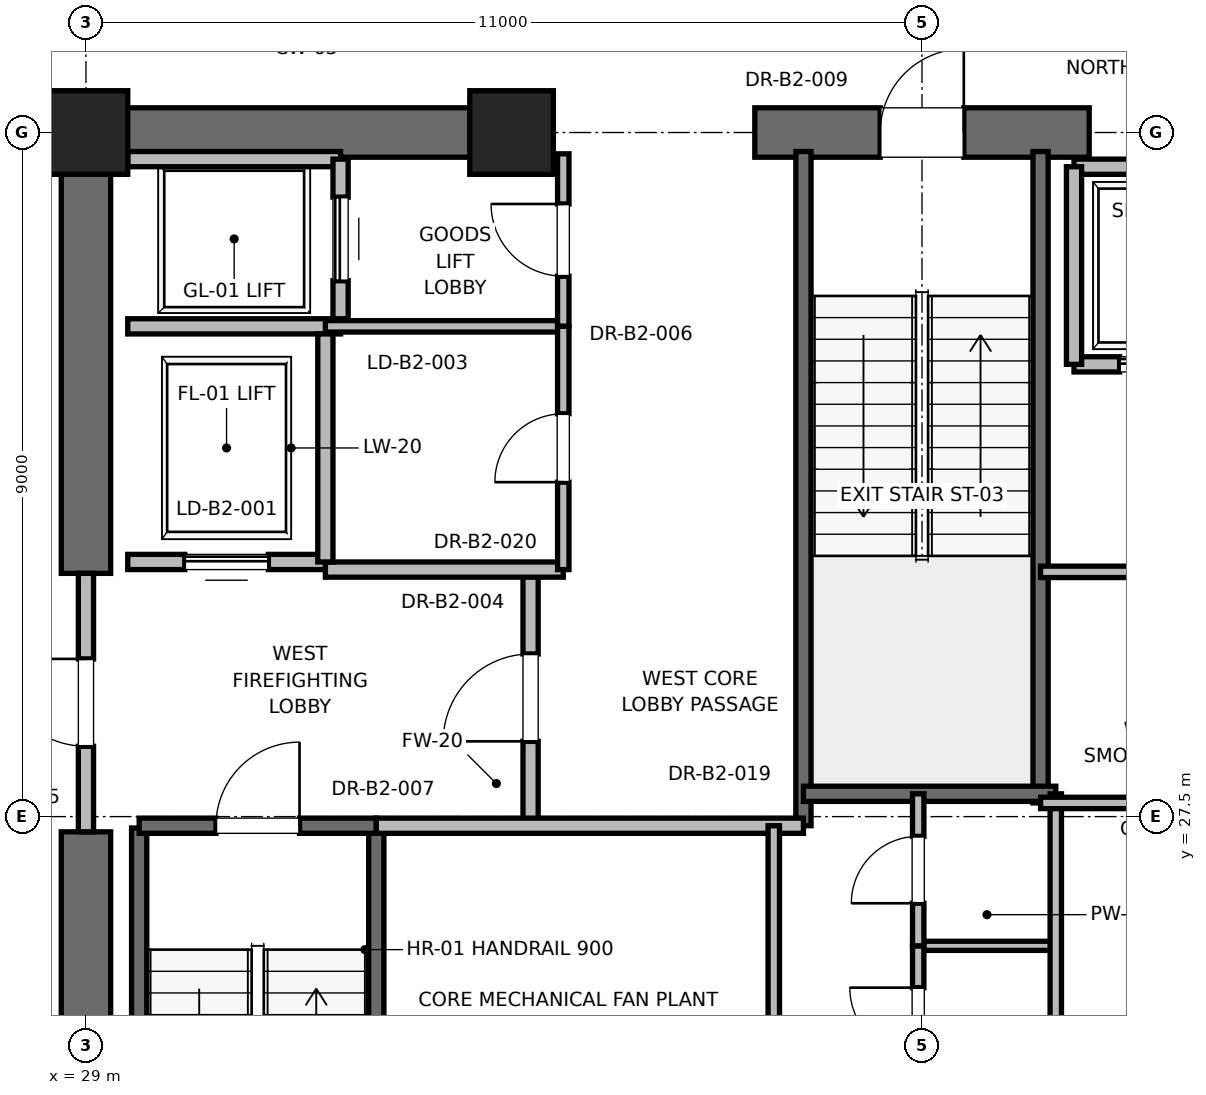
"""IFC4 building model, lengths in metres.
Left out: names, types, materials, properties, quantities, classifications, styles, units other than length and angle.
Written with IfcOpenShell. Run it as: python <this file> out.ifc"""

import sys

from ifc_helpers import new_model, si_unit, direction, frame, frame_2d, origin, origin_2d, place, context, subcontext, project, spatial, rectangle, extrude, element, fill, save


model = new_model("IFC4")
c1 = context("Model", 3, precision=1e-05, world=origin(), true_north=direction((0.0, 1.0)))
c2 = subcontext(c1, "Body", "Model", "MODEL_VIEW")
j1 = project(units=[si_unit("LENGTHUNIT", "METRE"), si_unit("PLANEANGLEUNIT", "RADIAN")], contexts=[c1])
p1 = place(None, origin())
s1 = spatial("IfcSite", under=j1, at=p1, CompositionType="ELEMENT")
p2 = place(p1, origin())
s2 = spatial("IfcBuilding", under=s1, at=p2, CompositionType="ELEMENT")
p3 = place(p2, frame((0.0, 0.0, -9.0)))
s3 = spatial("IfcBuildingStorey", under=s2, at=p3, CompositionType="ELEMENT", Elevation=-9.0)
for number, where, z_axis, x_axis in (
    (1, (29.0, 36.5, -0.3), (0.0, 0.0, 1.0), (1.0, 0.0, 0.0)),
    (2, (34.6, 36.5, -0.3), (0.0, 0.0, 1.0), (1.0, 0.0, 0.0)),
):
    element("IfcColumn", number, at=place(p3, frame(where, z_axis=z_axis, x_axis=x_axis)), inside=s3, PredefinedType="PILASTER", context=c2, shape_type="SweptSolid", body=[
        extrude(rectangle(XDim=1.1, YDim=1.1, at=origin_2d()), origin(), (0.0, 0.0, 1.0), 4.8),
    ])
p4 = place(p3, frame((29.0, 36.5, -0.3), z_axis=(0.0, 0.0, 1.0), x_axis=(1.0, 0.0, 0.0)))
e3 = element("IfcWall", 3, at=p4, inside=s3, PredefinedType="SHEAR", context=c2, shape_type="SweptSolid", body=[
    extrude(rectangle(XDim=5.8, YDim=0.65, at=frame_2d((2.9, 0.0))), origin(), (0.0, 0.0, 1.0), 4.5),
])
p5 = place(p3, frame((37.8, 36.5, -0.3), z_axis=(0.0, 0.0, 1.0), x_axis=(1.0, 0.0, 0.0)))
e4 = element("IfcWall", 4, at=p5, inside=s3, PredefinedType="SHEAR", context=c2, shape_type="SweptSolid", body=[
    extrude(rectangle(XDim=4.4, YDim=0.65, at=frame_2d((2.2, 0.0))), origin(), (0.0, 0.0, 1.0), 4.5),
])
p6 = place(p5, frame((1.65, 0.0, 0.3)))
e5 = element("IfcOpeningElement", 5, at=p6, cuts=e4, PredefinedType="OPENING", context=c2, shape_type="SweptSolid", body=[
    extrude(rectangle(XDim=1.1, YDim=2.15, at=frame_2d((0.55, 1.075))), frame((0.0, 0.325, 0.0), z_axis=(0.0, -1.0, 0.0), x_axis=(1.0, 0.0, 0.0)), (0.0, 0.0, 1.0), 0.65),
])
p7 = place(p3, frame((29.0, 18.5, -0.3), z_axis=(0.0, 0.0, 1.0), x_axis=(0.0, 1.0, 0.0)))
e6 = element("IfcWall", 6, at=p7, inside=s3, PredefinedType="SHEAR", context=c2, shape_type="SweptSolid", body=[
    extrude(rectangle(XDim=8.8, YDim=0.65, at=frame_2d((4.4, 0.0))), origin(), (0.0, 0.0, 1.0), 4.5),
])
p8 = place(p3, frame((29.0, 30.7, -0.3), z_axis=(0.0, 0.0, 1.0), x_axis=(0.0, 1.0, 0.0)))
e7 = element("IfcWall", 7, at=p8, inside=s3, PredefinedType="SHEAR", context=c2, shape_type="SweptSolid", body=[
    extrude(rectangle(XDim=5.8, YDim=0.65, at=frame_2d((2.9, 0.0))), origin(), (0.0, 0.0, 1.0), 4.5),
])
p9 = place(p3, frame((29.7, 19.2, -0.3), z_axis=(0.0, 0.0, 1.0), x_axis=(0.0, 1.0, 0.0)))
e8 = element("IfcWall", 8, at=p9, inside=s3, PredefinedType="SOLIDWALL", context=c2, shape_type="SweptSolid", body=[
    extrude(rectangle(XDim=8.15, YDim=0.2, at=frame_2d((4.075, 0.0))), origin(), (0.0, 0.0, 1.0), 4.5),
])
p10 = place(p3, frame((32.82, 18.6, -0.3), z_axis=(0.0, 0.0, 1.0), x_axis=(0.0, 1.0, 0.0)))
e9 = element("IfcWall", 9, at=p10, inside=s3, PredefinedType="SOLIDWALL", context=c2, shape_type="SweptSolid", body=[
    extrude(rectangle(XDim=8.78, YDim=0.2, at=frame_2d((4.39, 0.0))), origin(), (0.0, 0.0, 1.0), 4.5),
])
p11 = place(p3, frame((29.7, 27.38, -0.3), z_axis=(0.0, 0.0, 1.0), x_axis=(1.0, 0.0, 0.0)))
e10 = element("IfcWall", 10, at=p11, inside=s3, PredefinedType="SOLIDWALL", context=c2, shape_type="SweptSolid", body=[
    extrude(rectangle(XDim=3.12, YDim=0.2, at=frame_2d((1.56, 0.0))), origin(), (0.0, 0.0, 1.0), 4.5),
])
p12 = place(p11, frame((1.01, 0.0, 0.3)))
e11 = element("IfcOpeningElement", 11, at=p12, cuts=e10, PredefinedType="OPENING", context=c2, shape_type="SweptSolid", body=[
    extrude(rectangle(XDim=1.1, YDim=2.15, at=frame_2d((0.55, 1.075))), frame((0.0, 0.1, 0.0), z_axis=(0.0, -1.0, 0.0), x_axis=(1.0, 0.0, 0.0)), (0.0, 0.0, 1.0), 0.2),
])
p13 = place(p3, frame((38.44, 27.38, -0.3), z_axis=(0.0, 0.0, 1.0), x_axis=(0.0, 1.0, 0.0)))
e12 = element("IfcWall", 12, at=p13, inside=s3, PredefinedType="SOLIDWALL", context=c2, shape_type="SweptSolid", body=[
    extrude(rectangle(XDim=8.87, YDim=0.2, at=frame_2d((4.435, 0.0))), origin(), (0.0, 0.0, 1.0), 4.5),
])
p14 = place(p3, frame((41.56, 27.68, -0.3), z_axis=(0.0, 0.0, 1.0), x_axis=(0.0, 1.0, 0.0)))
e13 = element("IfcWall", 13, at=p14, inside=s3, PredefinedType="SOLIDWALL", context=c2, shape_type="SweptSolid", body=[
    extrude(rectangle(XDim=8.57, YDim=0.2, at=frame_2d((4.285, 0.0))), origin(), (0.0, 0.0, 1.0), 4.5),
])
p15 = place(p3, frame((38.44, 27.8, -0.3), z_axis=(0.0, 0.0, 1.0), x_axis=(1.0, 0.0, 0.0)))
e14 = element("IfcWall", 14, at=p15, inside=s3, PredefinedType="SOLIDWALL", context=c2, shape_type="SweptSolid", body=[
    extrude(rectangle(XDim=3.32, YDim=0.2, at=frame_2d((1.66, 0.0))), origin(), (0.0, 0.0, 1.0), 4.5),
])
p16 = place(p3, frame((34.85, 27.38, 0.0), z_axis=(0.0, 0.0, 1.0), x_axis=(0.0, 1.0, 0.0)))
e15 = element("IfcWall", 15, at=p16, inside=s3, PredefinedType="PARTITIONING", context=c2, shape_type="SweptSolid", body=[
    extrude(rectangle(XDim=3.37, YDim=0.2, at=frame_2d((1.685, 0.0))), origin(), (0.0, 0.0, 1.0), 4.2),
])
p17 = place(p16, frame((1.11, 0.0, 0.0)))
e16 = element("IfcOpeningElement", 16, at=p17, cuts=e15, PredefinedType="OPENING", context=c2, shape_type="SweptSolid", body=[
    extrude(rectangle(XDim=1.15, YDim=2.2, at=frame_2d((0.575, 1.1))), frame((0.0, 0.1, 0.0), z_axis=(0.0, -1.0, 0.0), x_axis=(1.0, 0.0, 0.0)), (0.0, 0.0, 1.0), 0.2),
])
p18 = place(p3, frame((29.0, 27.3, 0.0), z_axis=(0.0, 0.0, 1.0), x_axis=(0.0, 1.0, 0.0)))
e17 = element("IfcWall", 17, at=p18, inside=s3, PredefinedType="PARTITIONING", context=c2, shape_type="SweptSolid", body=[
    extrude(rectangle(XDim=3.4, YDim=0.2, at=frame_2d((1.7, 0.0))), origin(), (0.0, 0.0, 1.0), 2.98),
])
p19 = place(p18, frame((1.125, 0.0, 0.0)))
e18 = element("IfcOpeningElement", 18, at=p19, cuts=e17, PredefinedType="OPENING", context=c2, shape_type="SweptSolid", body=[
    extrude(rectangle(XDim=1.15, YDim=2.2, at=frame_2d((0.575, 1.1))), frame((0.0, 0.1, 0.0), z_axis=(0.0, -1.0, 0.0), x_axis=(1.0, 0.0, 0.0)), (0.0, 0.0, 1.0), 0.2),
])
p20 = place(p3, frame((32.82, 27.38, 0.0), z_axis=(0.0, 0.0, 1.0), x_axis=(1.0, 0.0, 0.0)))
e19 = element("IfcWall", 19, at=p20, inside=s3, PredefinedType="PARTITIONING", context=c2, shape_type="SweptSolid", body=[
    extrude(rectangle(XDim=5.62, YDim=0.2, at=frame_2d((2.81, 0.0))), origin(), (0.0, 0.0, 1.0), 4.2),
])
p21 = place(p3, frame((32.15, 30.75, 0.0), z_axis=(0.0, 0.0, 1.0), x_axis=(1.0, 0.0, 0.0)))
e20 = element("IfcWall", 20, at=p21, inside=s3, PredefinedType="PARTITIONING", context=c2, shape_type="SweptSolid", body=[
    extrude(rectangle(XDim=3.13, YDim=0.2, at=frame_2d((1.565, 0.0))), origin(), (0.0, 0.0, 1.0), 4.2),
])
p22 = place(p3, frame((29.55, 30.85, 0.0), z_axis=(0.0, 0.0, 1.0), x_axis=(1.0, 0.0, 0.0)))
e21 = element("IfcWall", 21, at=p22, inside=s3, PredefinedType="SOLIDWALL", context=c2, shape_type="SweptSolid", body=[
    extrude(rectangle(XDim=2.6, YDim=0.2, at=frame_2d((1.3, 0.0))), origin(), (0.0, 0.0, 1.0), 2.98),
])
p23 = place(p22, frame((0.75, 0.0, 0.0)))
e22 = element("IfcOpeningElement", 22, at=p23, cuts=e21, PredefinedType="OPENING", context=c2, shape_type="SweptSolid", body=[
    extrude(rectangle(XDim=1.1, YDim=2.2, at=frame_2d((0.55, 1.1))), frame((0.0, 0.1, 0.0), z_axis=(0.0, -1.0, 0.0), x_axis=(1.0, 0.0, 0.0)), (0.0, 0.0, 1.0), 0.2),
])
p24 = place(p3, frame((29.55, 33.95, 0.0), z_axis=(0.0, 0.0, 1.0), x_axis=(1.0, 0.0, 0.0)))
e23 = element("IfcWall", 23, at=p24, inside=s3, PredefinedType="SOLIDWALL", context=c2, shape_type="SweptSolid", body=[
    extrude(rectangle(XDim=2.8, YDim=0.2, at=frame_2d((1.4, 0.0))), origin(), (0.0, 0.0, 1.0), 4.2),
])
p25 = place(p3, frame((32.15, 30.85, 0.0), z_axis=(0.0, 0.0, 1.0), x_axis=(0.0, 1.0, 0.0)))
e24 = element("IfcWall", 24, at=p25, inside=s3, PredefinedType="SOLIDWALL", context=c2, shape_type="SweptSolid", body=[
    extrude(rectangle(XDim=3.0, YDim=0.2, at=frame_2d((1.5, 0.0))), origin(), (0.0, 0.0, 1.0), 4.2),
])
p26 = place(p3, frame((32.35, 36.15, 0.0), z_axis=(0.0, 0.0, 1.0), x_axis=(-1.0, 0.0, 0.0)))
e25 = element("IfcWall", 25, at=p26, inside=s3, PredefinedType="SOLIDWALL", context=c2, shape_type="SweptSolid", body=[
    extrude(rectangle(XDim=2.8, YDim=0.2, at=frame_2d((1.4, 0.0))), origin(), (0.0, 0.0, 1.0), 3.38),
])
p27 = place(p3, frame((32.35, 34.05, 0.0), z_axis=(0.0, 0.0, 1.0), x_axis=(0.0, 1.0, 0.0)))
e26 = element("IfcWall", 26, at=p27, inside=s3, PredefinedType="SOLIDWALL", context=c2, shape_type="SweptSolid", body=[
    extrude(rectangle(XDim=2.1, YDim=0.2, at=frame_2d((1.05, 0.0))), origin(), (0.0, 0.0, 1.0), 4.2),
])
p28 = place(p27, frame((0.5, 0.0, 0.0)))
e27 = element("IfcOpeningElement", 27, at=p28, cuts=e26, PredefinedType="OPENING", context=c2, shape_type="SweptSolid", body=[
    extrude(rectangle(XDim=1.1, YDim=2.2, at=frame_2d((0.55, 1.1))), frame((0.0, 0.1, 0.0), z_axis=(0.0, -1.0, 0.0), x_axis=(1.0, 0.0, 0.0)), (0.0, 0.0, 1.0), 0.2),
])
p29 = place(p3, frame((42.0, 33.45, 0.0), z_axis=(0.0, 0.0, 1.0), x_axis=(1.0, 0.0, 0.0)))
e28 = element("IfcWall", 28, at=p29, inside=s3, PredefinedType="SOLIDWALL", context=c2, shape_type="SweptSolid", body=[
    extrude(rectangle(XDim=2.3, YDim=0.2, at=frame_2d((1.15, 0.0))), origin(), (0.0, 0.0, 1.0), 4.2),
])
p30 = place(p29, frame((0.6, 0.0, 0.0)))
e29 = element("IfcOpeningElement", 29, at=p30, cuts=e28, PredefinedType="OPENING", context=c2, shape_type="SweptSolid", body=[
    extrude(rectangle(XDim=1.1, YDim=2.2, at=frame_2d((0.55, 1.1))), frame((0.0, 0.1, 0.0), z_axis=(0.0, -1.0, 0.0), x_axis=(1.0, 0.0, 0.0)), (0.0, 0.0, 1.0), 0.2),
])
p31 = place(p3, frame((44.3, 36.05, 0.0), z_axis=(0.0, 0.0, 1.0), x_axis=(-1.0, 0.0, 0.0)))
e30 = element("IfcWall", 30, at=p31, inside=s3, PredefinedType="SOLIDWALL", context=c2, shape_type="SweptSolid", body=[
    extrude(rectangle(XDim=2.3, YDim=0.2, at=frame_2d((1.15, 0.0))), origin(), (0.0, 0.0, 1.0), 2.98),
])
p32 = place(p3, frame((42.0, 36.05, 0.0), z_axis=(0.0, 0.0, 1.0), x_axis=(0.0, -1.0, 0.0)))
e31 = element("IfcWall", 31, at=p32, inside=s3, PredefinedType="SOLIDWALL", context=c2, shape_type="SweptSolid", body=[
    extrude(rectangle(XDim=2.6, YDim=0.2, at=frame_2d((1.3, 0.0))), origin(), (0.0, 0.0, 1.0), 2.98),
])
p33 = place(p3, frame((39.95, 25.8, 0.0), z_axis=(0.0, 0.0, 1.0), x_axis=(1.0, 0.0, 0.0)))
e32 = element("IfcWall", 32, at=p33, inside=s3, PredefinedType="PARTITIONING", context=c2, shape_type="SweptSolid", body=[
    extrude(rectangle(XDim=1.81, YDim=0.12, at=frame_2d((0.905, 0.0))), origin(), (0.0, 0.0, 1.0), 2.85),
])
p34 = place(p3, frame((41.76, 23.8, 0.0), z_axis=(0.0, 0.0, 1.0), x_axis=(0.0, 1.0, 0.0)))
e33 = element("IfcWall", 33, at=p34, inside=s3, PredefinedType="PARTITIONING", context=c2, shape_type="SweptSolid", body=[
    extrude(rectangle(XDim=4.0, YDim=0.15, at=frame_2d((2.0, 0.0))), origin(), (0.0, 0.0, 1.0), 2.85),
])
p35 = place(p3, frame((39.95, 23.8, 0.0), z_axis=(0.0, 0.0, 1.0), x_axis=(0.0, 1.0, 0.0)))
e34 = element("IfcWall", 34, at=p35, inside=s3, PredefinedType="PARTITIONING", context=c2, shape_type="SweptSolid", body=[
    extrude(rectangle(XDim=2.0, YDim=0.15, at=frame_2d((1.0, 0.0))), origin(), (0.0, 0.0, 1.0), 2.85),
])
p36 = place(p35, frame((0.55, 0.0, 0.0)))
e35 = element("IfcOpeningElement", 35, at=p36, cuts=e34, PredefinedType="OPENING", context=c2, shape_type="SweptSolid", body=[
    extrude(rectangle(XDim=0.9, YDim=2.1, at=frame_2d((0.45, 1.05))), frame((0.0, 0.075, 0.0), z_axis=(0.0, -1.0, 0.0), x_axis=(1.0, 0.0, 0.0)), (0.0, 0.0, 1.0), 0.15),
])
p37 = place(p3, frame((39.95, 25.8, 0.0), z_axis=(0.0, 0.0, 1.0), x_axis=(0.0, 1.0, 0.0)))
e36 = element("IfcWall", 36, at=p37, inside=s3, PredefinedType="PARTITIONING", context=c2, shape_type="SweptSolid", body=[
    extrude(rectangle(XDim=2.0, YDim=0.15, at=frame_2d((1.0, 0.0))), origin(), (0.0, 0.0, 1.0), 2.85),
])
p38 = place(p37, frame((0.56, 0.0, 0.0)))
e37 = element("IfcOpeningElement", 37, at=p38, cuts=e36, PredefinedType="OPENING", context=c2, shape_type="SweptSolid", body=[
    extrude(rectangle(XDim=0.88, YDim=2.1, at=frame_2d((0.44, 1.05))), frame((0.0, 0.075, 0.0), z_axis=(0.0, -1.0, 0.0), x_axis=(1.0, 0.0, 0.0)), (0.0, 0.0, 1.0), 0.15),
])
p39 = place(p3, frame((32.15, 33.95, 0.0), z_axis=(0.0, 0.0, 1.0), x_axis=(1.0, 0.0, 0.0)))
e38 = element("IfcWall", 38, at=p39, inside=s3, PredefinedType="PARTITIONING", context=c2, shape_type="SweptSolid", body=[
    extrude(rectangle(XDim=3.13, YDim=0.15, at=frame_2d((1.565, 0.0))), origin(), (0.0, 0.0, 1.0), 2.85),
])
p40 = place(p3, frame((35.28, 33.95, 0.0), z_axis=(0.0, 0.0, 1.0), x_axis=(0.0, 1.0, 0.0)))
e39 = element("IfcWall", 39, at=p40, inside=s3, PredefinedType="PARTITIONING", context=c2, shape_type="SweptSolid", body=[
    extrude(rectangle(XDim=2.27, YDim=0.15, at=frame_2d((1.135, 0.0))), origin(), (0.0, 0.0, 1.0), 2.85),
])
p41 = place(p40, frame((0.66, 0.0, 0.0)))
e40 = element("IfcOpeningElement", 40, at=p41, cuts=e39, PredefinedType="OPENING", context=c2, shape_type="SweptSolid", body=[
    extrude(rectangle(XDim=0.95, YDim=2.15, at=frame_2d((0.475, 1.075))), frame((0.0, 0.075, 0.0), z_axis=(0.0, -1.0, 0.0), x_axis=(1.0, 0.0, 0.0)), (0.0, 0.0, 1.0), 0.15),
])
p42 = place(p3, frame((35.28, 30.75, 0.0), z_axis=(0.0, 0.0, 1.0), x_axis=(0.0, 1.0, 0.0)))
e41 = element("IfcWall", 41, at=p42, inside=s3, PredefinedType="PARTITIONING", context=c2, shape_type="SweptSolid", body=[
    extrude(rectangle(XDim=3.2, YDim=0.15, at=frame_2d((1.6, 0.0))), origin(), (0.0, 0.0, 1.0), 2.85),
])
p43 = place(p42, frame((1.15, 0.0, 0.0)))
e42 = element("IfcOpeningElement", 42, at=p43, cuts=e41, PredefinedType="OPENING", context=c2, shape_type="SweptSolid", body=[
    extrude(rectangle(XDim=0.9, YDim=2.1, at=frame_2d((0.45, 1.05))), frame((0.0, 0.075, 0.0), z_axis=(0.0, -1.0, 0.0), x_axis=(1.0, 0.0, 0.0)), (0.0, 0.0, 1.0), 0.15),
])
p44 = place(p3, frame((38.05, 18.6, 0.0), z_axis=(0.0, 0.0, 1.0), x_axis=(0.0, 1.0, 0.0)))
e43 = element("IfcWall", 43, at=p44, inside=s3, PredefinedType="PARTITIONING", context=c2, shape_type="SweptSolid", body=[
    extrude(rectangle(XDim=8.78, YDim=0.15, at=frame_2d((4.39, 0.0))), origin(), (0.0, 0.0, 1.0), 2.85),
])
p45 = place(p44, frame((3.95, 0.0, 0.0)))
e44 = element("IfcOpeningElement", 44, at=p45, cuts=e43, PredefinedType="OPENING", context=c2, shape_type="SweptSolid", body=[
    extrude(rectangle(XDim=0.88, YDim=2.1, at=frame_2d((0.44, 1.05))), frame((0.0, 0.075, 0.0), z_axis=(0.0, -1.0, 0.0), x_axis=(1.0, 0.0, 0.0)), (0.0, 0.0, 1.0), 0.15),
])
p46 = place(p3, frame((41.56, 27.68, 0.0), z_axis=(0.0, 0.0, 1.0), x_axis=(1.0, 0.0, 0.0)))
e45 = element("IfcWall", 45, at=p46, inside=s3, PredefinedType="PARTITIONING", context=c2, shape_type="SweptSolid", body=[
    extrude(rectangle(XDim=3.59, YDim=0.15, at=frame_2d((1.795, 0.0))), origin(), (0.0, 0.0, 1.0), 2.85),
])
p47 = place(p3, frame((41.56, 30.72, 0.0), z_axis=(0.0, 0.0, 1.0), x_axis=(1.0, 0.0, 0.0)))
e46 = element("IfcWall", 46, at=p47, inside=s3, PredefinedType="PARTITIONING", context=c2, shape_type="SweptSolid", body=[
    extrude(rectangle(XDim=3.59, YDim=0.15, at=frame_2d((1.795, 0.0))), origin(), (0.0, 0.0, 1.0), 2.85),
])
p48 = place(p47, frame((1.355, 0.0, 0.0)))
e47 = element("IfcOpeningElement", 47, at=p48, cuts=e46, PredefinedType="OPENING", context=c2, shape_type="SweptSolid", body=[
    extrude(rectangle(XDim=0.88, YDim=2.1, at=frame_2d((0.44, 1.05))), frame((0.0, 0.075, 0.0), z_axis=(0.0, -1.0, 0.0), x_axis=(1.0, 0.0, 0.0)), (0.0, 0.0, 1.0), 0.15),
])
p49 = place(p12, origin())
e48 = element("IfcDoor", 48, at=p49, inside=s3, OperationType="SINGLE_SWING_RIGHT", PredefinedType="DOOR", context=c2, shape_type="SweptSolid", body=[
    extrude(rectangle(XDim=1.1, YDim=2.15, at=frame_2d((0.55, 1.075))), frame((0.0, 0.025, 0.0), z_axis=(0.0, -1.0, 0.0), x_axis=(1.0, 0.0, 0.0)), (0.0, 0.0, 1.0), 0.05),
])
fill(e11, e48)
p50 = place(p6, origin())
e49 = element("IfcDoor", 49, at=p50, inside=s3, OperationType="SINGLE_SWING_RIGHT", PredefinedType="DOOR", context=c2, shape_type="SweptSolid", body=[
    extrude(rectangle(XDim=1.1, YDim=2.15, at=frame_2d((0.55, 1.075))), frame((0.0, 0.025, 0.0), z_axis=(0.0, -1.0, 0.0), x_axis=(1.0, 0.0, 0.0)), (0.0, 0.0, 1.0), 0.05),
])
fill(e5, e49)
p51 = place(p17, origin())
e50 = element("IfcDoor", 50, at=p51, inside=s3, OperationType="SINGLE_SWING_LEFT", PredefinedType="DOOR", context=c2, shape_type="SweptSolid", body=[
    extrude(rectangle(XDim=1.15, YDim=2.2, at=frame_2d((0.575, 1.1))), frame((0.0, 0.025, 0.0), z_axis=(0.0, -1.0, 0.0), x_axis=(1.0, 0.0, 0.0)), (0.0, 0.0, 1.0), 0.05),
])
fill(e16, e50)
p52 = place(p19, origin())
e51 = element("IfcDoor", 51, at=p52, inside=s3, OperationType="SINGLE_SWING_RIGHT", PredefinedType="DOOR", context=c2, shape_type="SweptSolid", body=[
    extrude(rectangle(XDim=1.15, YDim=2.2, at=frame_2d((0.575, 1.1))), frame((0.0, 0.025, 0.0), z_axis=(0.0, -1.0, 0.0), x_axis=(1.0, 0.0, 0.0)), (0.0, 0.0, 1.0), 0.05),
])
fill(e18, e51)
p53 = place(p23, origin())
e52 = element("IfcDoor", 52, at=p53, inside=s3, OperationType="SLIDING_TO_RIGHT", PredefinedType="DOOR", context=c2, shape_type="SweptSolid", body=[
    extrude(rectangle(XDim=1.1, YDim=2.2, at=frame_2d((0.55, 1.1))), frame((0.0, 0.025, 0.0), z_axis=(0.0, -1.0, 0.0), x_axis=(1.0, 0.0, 0.0)), (0.0, 0.0, 1.0), 0.05),
])
fill(e22, e52)
p54 = place(p28, origin())
e53 = element("IfcDoor", 53, at=p54, inside=s3, OperationType="SLIDING_TO_RIGHT", PredefinedType="DOOR", context=c2, shape_type="SweptSolid", body=[
    extrude(rectangle(XDim=1.1, YDim=2.2, at=frame_2d((0.55, 1.1))), frame((0.0, 0.025, 0.0), z_axis=(0.0, -1.0, 0.0), x_axis=(1.0, 0.0, 0.0)), (0.0, 0.0, 1.0), 0.05),
])
fill(e27, e53)
p55 = place(p30, origin())
e54 = element("IfcDoor", 54, at=p55, inside=s3, OperationType="SLIDING_TO_RIGHT", PredefinedType="DOOR", context=c2, shape_type="SweptSolid", body=[
    extrude(rectangle(XDim=1.1, YDim=2.2, at=frame_2d((0.55, 1.1))), frame((0.0, 0.025, 0.0), z_axis=(0.0, -1.0, 0.0), x_axis=(1.0, 0.0, 0.0)), (0.0, 0.0, 1.0), 0.05),
])
fill(e29, e54)
p56 = place(p36, origin())
e55 = element("IfcDoor", 55, at=p56, inside=s3, OperationType="SINGLE_SWING_RIGHT", PredefinedType="DOOR", context=c2, shape_type="SweptSolid", body=[
    extrude(rectangle(XDim=0.9, YDim=2.1, at=frame_2d((0.45, 1.05))), frame((0.0, 0.025, 0.0), z_axis=(0.0, -1.0, 0.0), x_axis=(1.0, 0.0, 0.0)), (0.0, 0.0, 1.0), 0.05),
])
fill(e35, e55)
p57 = place(p38, origin())
e56 = element("IfcDoor", 56, at=p57, inside=s3, OperationType="SINGLE_SWING_LEFT", PredefinedType="DOOR", context=c2, shape_type="SweptSolid", body=[
    extrude(rectangle(XDim=0.88, YDim=2.1, at=frame_2d((0.44, 1.05))), frame((0.0, 0.025, 0.0), z_axis=(0.0, -1.0, 0.0), x_axis=(1.0, 0.0, 0.0)), (0.0, 0.0, 1.0), 0.05),
])
fill(e37, e56)
p58 = place(p41, origin())
e57 = element("IfcDoor", 57, at=p58, inside=s3, OperationType="SINGLE_SWING_RIGHT", PredefinedType="DOOR", context=c2, shape_type="SweptSolid", body=[
    extrude(rectangle(XDim=0.95, YDim=2.15, at=frame_2d((0.475, 1.075))), frame((0.0, 0.025, 0.0), z_axis=(0.0, -1.0, 0.0), x_axis=(1.0, 0.0, 0.0)), (0.0, 0.0, 1.0), 0.05),
])
fill(e40, e57)
p59 = place(p43, origin())
e58 = element("IfcDoor", 58, at=p59, inside=s3, OperationType="SINGLE_SWING_LEFT", PredefinedType="DOOR", context=c2, shape_type="SweptSolid", body=[
    extrude(rectangle(XDim=0.9, YDim=2.1, at=frame_2d((0.45, 1.05))), frame((0.0, 0.025, 0.0), z_axis=(0.0, -1.0, 0.0), x_axis=(1.0, 0.0, 0.0)), (0.0, 0.0, 1.0), 0.05),
])
fill(e42, e58)
save(model, sys.argv[1])
